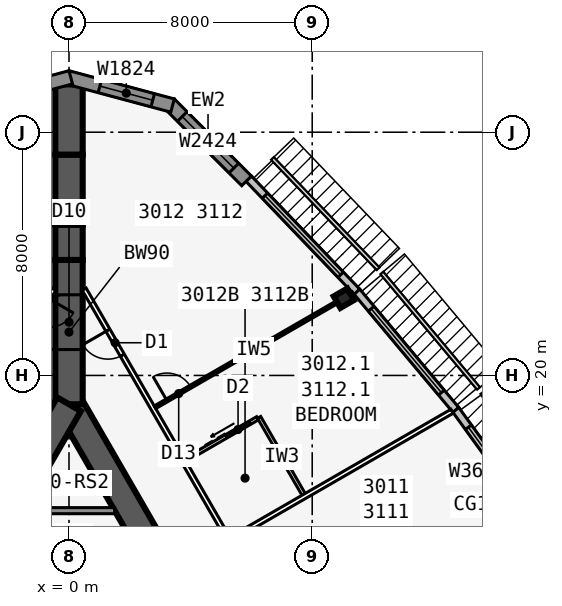
"""IFC4 building model, lengths in metres.
Left out: names, types, materials, properties, quantities, classifications, styles, units other than length and angle.
Written with IfcOpenShell. Run it as: python <this file> out.ifc"""

import sys

from ifc_helpers import new_model, si_unit, direction, frame, frame_2d, origin, origin_2d, place, context, subcontext, project, spatial, polyline, rectangle, i_section, outline, extrude, element, fill, save


model = new_model("IFC4")
c1 = context("Model", 3, precision=1e-05, world=origin(), true_north=direction((0.0, 1.0)))
c2 = subcontext(c1, "Body", "Model", "MODEL_VIEW")
j1 = project(units=[si_unit("LENGTHUNIT", "METRE"), si_unit("PLANEANGLEUNIT", "RADIAN")], contexts=[c1])
p1 = place(None, origin())
s1 = spatial("IfcSite", under=j1, at=p1, CompositionType="ELEMENT")
p2 = place(p1, origin())
s2 = spatial("IfcBuilding", under=s1, at=p2, CompositionType="ELEMENT")
p3 = place(p2, frame((0.0, 0.0, 118.1)))
s3 = spatial("IfcBuildingStorey", under=s2, at=p3, CompositionType="ELEMENT", Elevation=118.1)
p4 = place(p3, frame((16.5, -9.526, 0.0), z_axis=(0.0, 0.0, 1.0), x_axis=(-0.499999749417, 0.866025548458, 0.0)))
e1 = element("IfcWall", 1, at=p4, inside=s3, PredefinedType="SHEAR", context=c2, shape_type="SweptSolid", body=[
    extrude(rectangle(XDim=33.0, YDim=0.9, at=frame_2d((16.5, 0.0))), origin(), (0.0, 0.0, 1.0), 3.4),
])
p5 = place(p4, frame((14.15, 0.0, 0.0)))
e2 = element("IfcOpeningElement", 2, at=p5, cuts=e1, PredefinedType="OPENING", context=c2, shape_type="SweptSolid", body=[
    extrude(rectangle(XDim=1.8, YDim=2.13, at=frame_2d((0.9, 1.065))), frame((0.0, 0.46, 0.0), z_axis=(0.0, -1.0, 0.0), x_axis=(1.0, 0.0, 0.0)), (0.0, 0.0, 1.0), 0.92),
])
p6 = place(p4, frame((12.6, 0.0, 0.0)))
e3 = element("IfcOpeningElement", 3, at=p6, cuts=e1, PredefinedType="OPENING", context=c2, shape_type="SweptSolid", body=[
    extrude(rectangle(XDim=1.0, YDim=2.13, at=frame_2d((0.5, 1.065))), frame((0.0, 0.46, 0.0), z_axis=(0.0, -1.0, 0.0), x_axis=(1.0, 0.0, 0.0)), (0.0, 0.0, 1.0), 0.92),
])
p7 = place(p3, frame((0.0, 19.052, 0.0), z_axis=(0.0, 0.0, 1.0), x_axis=(-0.499999749417, -0.866025548458, 0.0)))
e4 = element("IfcWall", 4, at=p7, inside=s3, PredefinedType="SHEAR", context=c2, shape_type="SweptSolid", body=[
    extrude(rectangle(XDim=33.0, YDim=0.9, at=frame_2d((16.5, 0.0))), origin(), (0.0, 0.0, 1.0), 3.4),
])
p8 = place(p7, frame((14.15, 0.0, 0.0)))
e5 = element("IfcOpeningElement", 5, at=p8, cuts=e4, PredefinedType="OPENING", context=c2, shape_type="SweptSolid", body=[
    extrude(rectangle(XDim=1.8, YDim=2.13, at=frame_2d((0.9, 1.065))), frame((0.0, 0.46, 0.0), z_axis=(0.0, -1.0, 0.0), x_axis=(1.0, 0.0, 0.0)), (0.0, 0.0, 1.0), 0.92),
])
p9 = place(p7, frame((12.6, 0.0, 0.0)))
e6 = element("IfcOpeningElement", 6, at=p9, cuts=e4, PredefinedType="OPENING", context=c2, shape_type="SweptSolid", body=[
    extrude(rectangle(XDim=1.0, YDim=2.13, at=frame_2d((0.5, 1.065))), frame((0.0, 0.46, 0.0), z_axis=(0.0, -1.0, 0.0), x_axis=(1.0, 0.0, 0.0)), (0.0, 0.0, 1.0), 0.92),
])
p10 = place(p3, frame((0.0, 19.052, 0.0), z_axis=(0.0, 0.0, 1.0), x_axis=(0.0, 1.0, 0.0)))
e7 = element("IfcWall", 7, at=p10, inside=s3, PredefinedType="SHEAR", context=c2, shape_type="SweptSolid", body=[
    extrude(rectangle(XDim=4.746, YDim=0.9, at=frame_2d((2.373, 0.0))), origin(), (0.0, 0.0, 1.0), 3.4),
])
p11 = place(p10, frame((1.8, 0.0, 0.0)))
e8 = element("IfcOpeningElement", 8, at=p11, cuts=e7, PredefinedType="OPENING", context=c2, shape_type="SweptSolid", body=[
    extrude(rectangle(XDim=1.8, YDim=2.13, at=frame_2d((0.9, 1.065))), frame((0.0, 0.46, 0.0), z_axis=(0.0, -1.0, 0.0), x_axis=(1.0, 0.0, 0.0)), (0.0, 0.0, 1.0), 0.92),
])
p12 = place(p3, frame((0.0, 23.799, 0.0), z_axis=(0.0, 0.0, 1.0), x_axis=(0.0, 1.0, 0.0)))
e9 = element("IfcWall", 9, at=p12, inside=s3, PredefinedType="SHEAR", context=c2, shape_type="SweptSolid", body=[
    extrude(rectangle(XDim=1.155, YDim=0.9, at=frame_2d((0.577, 0.0))), origin(), (0.0, 0.0, 1.0), 3.4),
])
p13 = place(p3, frame((0.0, 24.953, 0.0), z_axis=(0.0, 0.0, 1.0), x_axis=(0.0, 1.0, 0.0)))
e10 = element("IfcWall", 10, at=p13, inside=s3, PredefinedType="SHEAR", context=c2, shape_type="SweptSolid", body=[
    extrude(rectangle(XDim=2.309, YDim=0.9, at=frame_2d((1.155, 0.0))), origin(), (0.0, 0.0, 1.0), 3.4),
])
p14 = place(p3, frame((0.0, 27.263, 0.0), z_axis=(0.0, 0.0, 1.0), x_axis=(0.0, 1.0, 0.0)))
e11 = element("IfcWall", 11, at=p14, inside=s3, PredefinedType="SHEAR", context=c2, shape_type="SweptSolid", body=[
    extrude(rectangle(XDim=2.31, YDim=0.9, at=frame_2d((1.155, 0.0))), origin(), (0.0, 0.0, 1.0), 3.4),
])
p15 = place(p3, frame((9.041, 22.541, 0.0), z_axis=(0.0, 0.0, 1.0), x_axis=(-0.5, 0.866025403784, 0.0)))
e12 = element("IfcColumn", 12, at=p15, inside=s3, PredefinedType="COLUMN", context=c2, shape_type="SweptSolid", body=[
    extrude(i_section(OverallWidth=0.437, OverallDepth=0.513, WebThickness=0.061, FlangeThickness=0.097, at=origin_2d()), origin(), (0.0, 0.0, 1.0), 3.4),
])
p16 = place(p3, frame((15.672, 14.807, 0.0), z_axis=(0.0, 0.0, 1.0), x_axis=(-0.587669188412, 0.809101307001, 0.0)))
e13 = element("IfcWall", 13, at=p16, inside=s3, PredefinedType="STANDARD", context=c2, shape_type="SweptSolid", body=[
    extrude(rectangle(XDim=5.028, YDim=0.25, at=frame_2d((2.514, 0.0))), origin(), (0.0, 0.0, 1.0), 3.235),
])
p17 = place(p16, frame((0.714, 0.0, 0.45)))
e14 = element("IfcOpeningElement", 14, at=p17, cuts=e13, PredefinedType="OPENING", context=c2, shape_type="SweptSolid", body=[
    extrude(rectangle(XDim=3.6, YDim=2.4, at=frame_2d((1.8, 1.2))), frame((0.0, 0.135, 0.0), z_axis=(0.0, -1.0, 0.0), x_axis=(1.0, 0.0, 0.0)), (0.0, 0.0, 1.0), 0.27),
])
p18 = place(p3, frame((12.723, 18.868, 0.0), z_axis=(0.0, 0.0, 1.0), x_axis=(-0.641810386606, 0.766863369607, 0.0)))
e15 = element("IfcWall", 15, at=p18, inside=s3, PredefinedType="STANDARD", context=c2, shape_type="SweptSolid", body=[
    extrude(rectangle(XDim=5.076, YDim=0.25, at=frame_2d((2.538, 0.0))), origin(), (0.0, 0.0, 1.0), 3.235),
])
p19 = place(p18, frame((0.738, 0.0, 0.45)))
e16 = element("IfcOpeningElement", 16, at=p19, cuts=e15, PredefinedType="OPENING", context=c2, shape_type="SweptSolid", body=[
    extrude(rectangle(XDim=3.6, YDim=2.4, at=frame_2d((1.8, 1.2))), frame((0.0, 0.135, 0.0), z_axis=(0.0, -1.0, 0.0), x_axis=(1.0, 0.0, 0.0)), (0.0, 0.0, 1.0), 0.27),
])
p20 = place(p3, frame((9.471, 22.754, 0.0), z_axis=(0.0, 0.0, 1.0), x_axis=(-0.691719937936, 0.722165858693, 0.0)))
e17 = element("IfcWall", 17, at=p20, inside=s3, PredefinedType="STANDARD", context=c2, shape_type="SweptSolid", body=[
    extrude(rectangle(XDim=5.148, YDim=0.25, at=frame_2d((2.574, 0.0))), origin(), (0.0, 0.0, 1.0), 3.235),
])
p21 = place(p20, frame((0.774, 0.0, 0.45)))
e18 = element("IfcOpeningElement", 18, at=p21, cuts=e17, PredefinedType="OPENING", context=c2, shape_type="SweptSolid", body=[
    extrude(rectangle(XDim=3.6, YDim=2.4, at=frame_2d((1.8, 1.2))), frame((0.0, 0.135, 0.0), z_axis=(0.0, -1.0, 0.0), x_axis=(1.0, 0.0, 0.0)), (0.0, 0.0, 1.0), 0.27),
])
p22 = place(p3, frame((5.841, 26.399, 0.0), z_axis=(0.0, 0.0, 1.0), x_axis=(-0.707106781187, 0.707106781187, 0.0)))
e19 = element("IfcWall", 19, at=p22, inside=s3, PredefinedType="SOLIDWALL", context=c2, shape_type="SweptSolid", body=[
    extrude(rectangle(XDim=3.586, YDim=0.45, at=frame_2d((1.793, 0.0))), origin(), (0.0, 0.0, 1.0), 3.235),
])
p23 = place(p22, frame((0.593, 0.0, 0.45)))
e20 = element("IfcOpeningElement", 20, at=p23, cuts=e19, PredefinedType="OPENING", context=c2, shape_type="SweptSolid", body=[
    extrude(rectangle(XDim=2.4, YDim=2.4, at=frame_2d((1.2, 1.2))), frame((0.0, 0.235, 0.0), z_axis=(0.0, -1.0, 0.0), x_axis=(1.0, 0.0, 0.0)), (0.0, 0.0, 1.0), 0.47),
])
p24 = place(p3, frame((3.406, 28.877, 0.0), z_axis=(0.0, 0.0, 1.0), x_axis=(-0.965924653531, 0.258823421857, 0.0)))
e21 = element("IfcWall", 21, at=p24, inside=s3, PredefinedType="SOLIDWALL", context=c2, shape_type="SweptSolid", body=[
    extrude(outline(polyline([(3.586, 0.225), (3.527, 0.225), (3.035, 0.093), (3.0, 0.225), (0.0, 0.225), (0.0, -0.225), (3.586, -0.225), (3.586, 0.225)])), origin(), (0.0, 0.0, 1.0), 3.235),
])
p25 = place(p24, frame((0.675, 0.0, 0.45)))
e22 = element("IfcOpeningElement", 22, at=p25, cuts=e21, PredefinedType="OPENING", context=c2, shape_type="SweptSolid", body=[
    extrude(rectangle(XDim=1.8, YDim=2.4, at=frame_2d((0.9, 1.2))), frame((0.0, 0.235, 0.0), z_axis=(0.0, -1.0, 0.0), x_axis=(1.0, 0.0, 0.0)), (0.0, 0.0, 1.0), 0.47),
])
p26 = place(p3, frame((0.058, 29.805, 0.0), z_axis=(0.0, 0.0, 1.0), x_axis=(-0.965924653531, -0.258823421857, 0.0)))
e23 = element("IfcWall", 23, at=p26, inside=s3, PredefinedType="SOLIDWALL", context=c2, shape_type="SweptSolid", body=[
    extrude(outline(polyline([(3.586, 0.225), (0.586, 0.225), (0.551, 0.093), (0.06, 0.225), (0.0, 0.225), (0.0, -0.225), (3.586, -0.225), (3.586, 0.225)])), origin(), (0.0, 0.0, 1.0), 3.235),
])
p27 = place(p26, frame((1.111, 0.0, 0.45)))
e24 = element("IfcOpeningElement", 24, at=p27, cuts=e23, PredefinedType="OPENING", context=c2, shape_type="SweptSolid", body=[
    extrude(rectangle(XDim=1.8, YDim=2.4, at=frame_2d((0.9, 1.2))), frame((0.0, 0.235, 0.0), z_axis=(0.0, -1.0, 0.0), x_axis=(1.0, 0.0, 0.0)), (0.0, 0.0, 1.0), 0.47),
])
p28 = place(p3, frame((20.027, -10.985, 0.0), z_axis=(0.0, 0.0, 1.0), x_axis=(-0.500001677587, 0.866024435227, 0.0)))
e25 = element("IfcWall", 25, at=p28, inside=s3, PredefinedType="PARTITIONING", context=c2, shape_type="SweptSolid", body=[
    extrude(rectangle(XDim=39.054, YDim=0.15, at=frame_2d((19.527, 0.0))), origin(), (0.0, 0.0, 1.0), 3.235),
])
p29 = place(p28, frame((0.352, 0.0, 0.0)))
e26 = element("IfcOpeningElement", 26, at=p29, cuts=e25, PredefinedType="OPENING", context=c2, shape_type="SweptSolid", body=[
    extrude(rectangle(XDim=0.95, YDim=2.13, at=frame_2d((0.475, 1.065))), frame((0.0, 0.085, 0.0), z_axis=(0.0, -1.0, 0.0), x_axis=(1.0, 0.0, 0.0)), (0.0, 0.0, 1.0), 0.17),
])
p30 = place(p28, frame((7.752, 0.0, 0.0)))
e27 = element("IfcOpeningElement", 27, at=p30, cuts=e25, PredefinedType="OPENING", context=c2, shape_type="SweptSolid", body=[
    extrude(rectangle(XDim=0.95, YDim=2.13, at=frame_2d((0.475, 1.065))), frame((0.0, 0.085, 0.0), z_axis=(0.0, -1.0, 0.0), x_axis=(1.0, 0.0, 0.0)), (0.0, 0.0, 1.0), 0.17),
])
p31 = place(p28, frame((17.752, 0.0, 0.0)))
e28 = element("IfcOpeningElement", 28, at=p31, cuts=e25, PredefinedType="OPENING", context=c2, shape_type="SweptSolid", body=[
    extrude(rectangle(XDim=0.95, YDim=2.13, at=frame_2d((0.475, 1.065))), frame((0.0, 0.085, 0.0), z_axis=(0.0, -1.0, 0.0), x_axis=(1.0, 0.0, 0.0)), (0.0, 0.0, 1.0), 0.17),
])
p32 = place(p28, frame((22.152, 0.0, 0.0)))
e29 = element("IfcOpeningElement", 29, at=p32, cuts=e25, PredefinedType="OPENING", context=c2, shape_type="SweptSolid", body=[
    extrude(rectangle(XDim=0.95, YDim=2.13, at=frame_2d((0.475, 1.065))), frame((0.0, 0.085, 0.0), z_axis=(0.0, -1.0, 0.0), x_axis=(1.0, 0.0, 0.0)), (0.0, 0.0, 1.0), 0.17),
])
p33 = place(p28, frame((27.152, 0.0, 0.0)))
e30 = element("IfcOpeningElement", 30, at=p33, cuts=e25, PredefinedType="OPENING", context=c2, shape_type="SweptSolid", body=[
    extrude(rectangle(XDim=0.95, YDim=2.13, at=frame_2d((0.475, 1.065))), frame((0.0, 0.085, 0.0), z_axis=(0.0, -1.0, 0.0), x_axis=(1.0, 0.0, 0.0)), (0.0, 0.0, 1.0), 0.17),
])
p34 = place(p28, frame((36.546, 0.0, 0.0)))
e31 = element("IfcOpeningElement", 31, at=p34, cuts=e25, PredefinedType="OPENING", context=c2, shape_type="SweptSolid", body=[
    extrude(rectangle(XDim=0.95, YDim=2.13, at=frame_2d((0.475, 1.065))), frame((0.0, 0.085, 0.0), z_axis=(0.0, -1.0, 0.0), x_axis=(1.0, 0.0, 0.0)), (0.0, 0.0, 1.0), 0.17),
])
p35 = place(p3, frame((5.329, 14.623, 0.0), z_axis=(0.0, 0.0, 1.0), x_axis=(0.866011723728, 0.500023693804, 0.0)))
e32 = element("IfcWall", 32, at=p35, inside=s3, PredefinedType="PARTITIONING", context=c2, shape_type="SweptSolid", body=[
    extrude(rectangle(XDim=8.395, YDim=0.15, at=frame_2d((4.198, 0.0))), origin(), (0.0, 0.0, 1.0), 2.389),
])
p36 = place(p3, frame((2.829, 18.954, 0.0), z_axis=(0.0, 0.0, 1.0), x_axis=(0.866015739374, 0.500016738876, 0.0)))
e33 = element("IfcWall", 33, at=p36, inside=s3, PredefinedType="PARTITIONING", context=c2, shape_type="SweptSolid", body=[
    extrude(rectangle(XDim=7.516, YDim=0.1, at=frame_2d((3.758, 0.0))), origin(), (0.0, 0.0, 1.0), 2.389),
])
p37 = place(p36, frame((0.45, 0.0, 0.0)))
e34 = element("IfcOpeningElement", 34, at=p37, cuts=e33, PredefinedType="OPENING", context=c2, shape_type="SweptSolid", body=[
    extrude(rectangle(XDim=0.9, YDim=2.13, at=frame_2d((0.45, 1.065))), frame((0.0, 0.06, 0.0), z_axis=(0.0, -1.0, 0.0), x_axis=(1.0, 0.0, 0.0)), (0.0, 0.0, 1.0), 0.12),
])
p38 = place(p3, frame((7.753, 16.023, 0.0), z_axis=(0.0, 0.0, 1.0), x_axis=(-0.499990139034, 0.866031096941, 0.0)))
e35 = element("IfcWall", 35, at=p38, inside=s3, PredefinedType="PLUMBINGWALL", context=c2, shape_type="SweptSolid", body=[
    extrude(rectangle(XDim=3.0, YDim=0.12, at=frame_2d((1.5, 0.0))), origin(), (0.0, 0.0, 1.0), 3.235),
])
p39 = place(p3, frame((3.829, 17.221, 0.0), z_axis=(0.0, 0.0, 1.0), x_axis=(0.865997131366, 0.500048966069, 0.0)))
e36 = element("IfcWall", 36, at=p39, inside=s3, PredefinedType="PLUMBINGWALL", context=c2, shape_type="SweptSolid", body=[
    extrude(rectangle(XDim=2.74, YDim=0.12, at=frame_2d((1.37, 0.0))), origin(), (0.0, 0.0, 1.0), 3.235),
])
p40 = place(p39, frame((1.55, 0.0, 0.0)))
e37 = element("IfcOpeningElement", 37, at=p40, cuts=e36, PredefinedType="OPENING", context=c2, shape_type="SweptSolid", body=[
    extrude(rectangle(XDim=0.9, YDim=2.13, at=frame_2d((0.45, 1.065))), frame((0.0, 0.07, 0.0), z_axis=(0.0, -1.0, 0.0), x_axis=(1.0, 0.0, 0.0)), (0.0, 0.0, 1.0), 0.14),
])
p41 = place(p3, frame((-0.5, 22.836, 0.0), z_axis=(0.0, 0.0, 1.0), x_axis=(-0.500001677587, -0.866024435227, 0.0)))
e38 = element("IfcWall", 38, at=p41, inside=s3, PredefinedType="PARTITIONING", context=c2, shape_type="SweptSolid", body=[
    extrude(rectangle(XDim=39.054, YDim=0.15, at=frame_2d((19.527, 0.0))), origin(), (0.0, 0.0, 1.0), 3.235),
])
p42 = place(p41, frame((0.352, 0.0, 0.0)))
e39 = element("IfcOpeningElement", 39, at=p42, cuts=e38, PredefinedType="OPENING", context=c2, shape_type="SweptSolid", body=[
    extrude(rectangle(XDim=0.95, YDim=2.13, at=frame_2d((0.475, 1.065))), frame((0.0, 0.085, 0.0), z_axis=(0.0, -1.0, 0.0), x_axis=(1.0, 0.0, 0.0)), (0.0, 0.0, 1.0), 0.17),
])
p43 = place(p41, frame((7.152, 0.0, 0.0)))
e40 = element("IfcOpeningElement", 40, at=p43, cuts=e38, PredefinedType="OPENING", context=c2, shape_type="SweptSolid", body=[
    extrude(rectangle(XDim=0.95, YDim=2.13, at=frame_2d((0.475, 1.065))), frame((0.0, 0.085, 0.0), z_axis=(0.0, -1.0, 0.0), x_axis=(1.0, 0.0, 0.0)), (0.0, 0.0, 1.0), 0.17),
])
p44 = place(p41, frame((12.152, 0.0, 0.0)))
e41 = element("IfcOpeningElement", 41, at=p44, cuts=e38, PredefinedType="OPENING", context=c2, shape_type="SweptSolid", body=[
    extrude(rectangle(XDim=0.95, YDim=2.13, at=frame_2d((0.475, 1.065))), frame((0.0, 0.085, 0.0), z_axis=(0.0, -1.0, 0.0), x_axis=(1.0, 0.0, 0.0)), (0.0, 0.0, 1.0), 0.17),
])
p45 = place(p41, frame((17.152, 0.0, 0.0)))
e42 = element("IfcOpeningElement", 42, at=p45, cuts=e38, PredefinedType="OPENING", context=c2, shape_type="SweptSolid", body=[
    extrude(rectangle(XDim=0.95, YDim=2.13, at=frame_2d((0.475, 1.065))), frame((0.0, 0.085, 0.0), z_axis=(0.0, -1.0, 0.0), x_axis=(1.0, 0.0, 0.0)), (0.0, 0.0, 1.0), 0.17),
])
p46 = place(p41, frame((22.752, 0.0, 0.0)))
e43 = element("IfcOpeningElement", 43, at=p46, cuts=e38, PredefinedType="OPENING", context=c2, shape_type="SweptSolid", body=[
    extrude(rectangle(XDim=0.95, YDim=2.13, at=frame_2d((0.475, 1.065))), frame((0.0, 0.085, 0.0), z_axis=(0.0, -1.0, 0.0), x_axis=(1.0, 0.0, 0.0)), (0.0, 0.0, 1.0), 0.17),
])
p47 = place(p41, frame((32.152, 0.0, 0.0)))
e44 = element("IfcOpeningElement", 44, at=p47, cuts=e38, PredefinedType="OPENING", context=c2, shape_type="SweptSolid", body=[
    extrude(rectangle(XDim=0.95, YDim=2.13, at=frame_2d((0.475, 1.065))), frame((0.0, 0.085, 0.0), z_axis=(0.0, -1.0, 0.0), x_axis=(1.0, 0.0, 0.0)), (0.0, 0.0, 1.0), 0.17),
])
p48 = place(p41, frame((37.752, 0.0, 0.0)))
e45 = element("IfcOpeningElement", 45, at=p48, cuts=e38, PredefinedType="OPENING", context=c2, shape_type="SweptSolid", body=[
    extrude(rectangle(XDim=0.95, YDim=2.13, at=frame_2d((0.475, 1.065))), frame((0.0, 0.085, 0.0), z_axis=(0.0, -1.0, 0.0), x_axis=(1.0, 0.0, 0.0)), (0.0, 0.0, 1.0), 0.17),
])
p49 = place(p3, frame((-1.501, 15.552, 0.0), z_axis=(0.0, 0.0, 1.0), x_axis=(1.0, 0.0, 0.0)))
e46 = element("IfcWall", 46, at=p49, inside=s3, PredefinedType="SOLIDWALL", context=c2, shape_type="SweptSolid", body=[
    extrude(rectangle(XDim=3.002, YDim=0.2, at=frame_2d((1.501, 0.0))), origin(), (0.0, 0.0, 1.0), 3.235),
])
p50 = place(p17, origin())
e47 = element("IfcWindow", 47, at=p50, inside=s3, PartitioningType="SINGLE_PANEL", PredefinedType="WINDOW", context=c2, shape_type="SweptSolid", body=[
    extrude(rectangle(XDim=3.6, YDim=2.4, at=frame_2d((1.8, 1.2))), frame((0.0, 0.03, 0.0), z_axis=(0.0, -1.0, 0.0), x_axis=(1.0, 0.0, 0.0)), (0.0, 0.0, 1.0), 0.06),
])
fill(e14, e47)
p51 = place(p19, origin())
e48 = element("IfcWindow", 48, at=p51, inside=s3, PartitioningType="SINGLE_PANEL", PredefinedType="WINDOW", context=c2, shape_type="SweptSolid", body=[
    extrude(rectangle(XDim=3.6, YDim=2.4, at=frame_2d((1.8, 1.2))), frame((0.0, 0.03, 0.0), z_axis=(0.0, -1.0, 0.0), x_axis=(1.0, 0.0, 0.0)), (0.0, 0.0, 1.0), 0.06),
])
fill(e16, e48)
p52 = place(p21, origin())
e49 = element("IfcWindow", 49, at=p52, inside=s3, PartitioningType="SINGLE_PANEL", PredefinedType="WINDOW", context=c2, shape_type="SweptSolid", body=[
    extrude(rectangle(XDim=3.6, YDim=2.4, at=frame_2d((1.8, 1.2))), frame((0.0, 0.03, 0.0), z_axis=(0.0, -1.0, 0.0), x_axis=(1.0, 0.0, 0.0)), (0.0, 0.0, 1.0), 0.06),
])
fill(e18, e49)
p53 = place(p23, origin())
e50 = element("IfcWindow", 50, at=p53, inside=s3, PartitioningType="SINGLE_PANEL", PredefinedType="WINDOW", context=c2, shape_type="SweptSolid", body=[
    extrude(rectangle(XDim=2.4, YDim=2.4, at=frame_2d((1.2, 1.2))), frame((0.0, 0.03, 0.0), z_axis=(0.0, -1.0, 0.0), x_axis=(1.0, 0.0, 0.0)), (0.0, 0.0, 1.0), 0.06),
])
fill(e20, e50)
p54 = place(p25, origin())
e51 = element("IfcWindow", 51, at=p54, inside=s3, PartitioningType="SINGLE_PANEL", PredefinedType="WINDOW", context=c2, shape_type="SweptSolid", body=[
    extrude(rectangle(XDim=1.8, YDim=2.4, at=frame_2d((0.9, 1.2))), frame((0.0, 0.03, 0.0), z_axis=(0.0, -1.0, 0.0), x_axis=(1.0, 0.0, 0.0)), (0.0, 0.0, 1.0), 0.06),
])
fill(e22, e51)
p55 = place(p37, origin())
e52 = element("IfcDoor", 52, at=p55, inside=s3, OperationType="SINGLE_SWING_LEFT", PredefinedType="DOOR", context=c2, shape_type="SweptSolid", body=[
    extrude(rectangle(XDim=0.9, YDim=2.13, at=frame_2d((0.45, 1.065))), frame((0.0, 0.025, 0.0), z_axis=(0.0, -1.0, 0.0), x_axis=(1.0, 0.0, 0.0)), (0.0, 0.0, 1.0), 0.05),
])
fill(e34, e52)
p56 = place(p40, origin())
e53 = element("IfcDoor", 53, at=p56, inside=s3, OperationType="SLIDING_TO_LEFT", PredefinedType="DOOR", context=c2, shape_type="SweptSolid", body=[
    extrude(rectangle(XDim=0.9, YDim=2.13, at=frame_2d((0.45, 1.065))), frame((0.0, 0.025, 0.0), z_axis=(0.0, -1.0, 0.0), x_axis=(1.0, 0.0, 0.0)), (0.0, 0.0, 1.0), 0.05),
])
fill(e37, e53)
p57 = place(p34, origin())
e54 = element("IfcDoor", 54, at=p57, inside=s3, OperationType="SINGLE_SWING_RIGHT", PredefinedType="DOOR", context=c2, shape_type="SweptSolid", body=[
    extrude(rectangle(XDim=0.95, YDim=2.13, at=frame_2d((0.475, 1.065))), frame((0.0, 0.025, 0.0), z_axis=(0.0, -1.0, 0.0), x_axis=(1.0, 0.0, 0.0)), (0.0, 0.0, 1.0), 0.05),
])
fill(e31, e54)
p58 = place(p11, origin())
e55 = element("IfcDoor", 55, at=p58, inside=s3, OperationType="DOUBLE_DOOR_DOUBLE_SWING", PredefinedType="DOOR", context=c2, shape_type="SweptSolid", body=[
    extrude(rectangle(XDim=1.8, YDim=2.13, at=frame_2d((0.9, 1.065))), frame((0.0, 0.025, 0.0), z_axis=(0.0, -1.0, 0.0), x_axis=(1.0, 0.0, 0.0)), (0.0, 0.0, 1.0), 0.05),
])
fill(e8, e55)
save(model, sys.argv[1])
